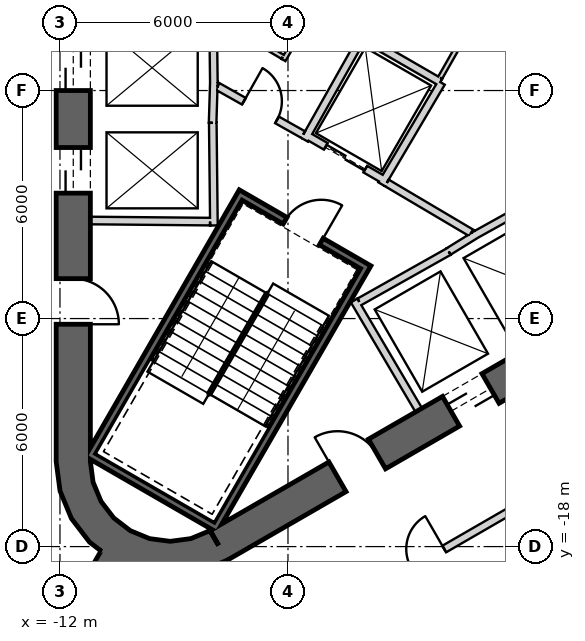
"""IFC4 building model, lengths in metres.
Left out: names, types, materials, properties, quantities, classifications, styles, units other than length and angle.
Written with IfcOpenShell. Run it as: python <this file> out.ifc"""

import sys

from ifc_helpers import new_model, si_unit, direction, frame, frame_2d, origin, place, context, subcontext, project, spatial, polyline, rectangle, outline, extrude, element, fill, save


model = new_model("IFC4")
c1 = context("Model", 3, precision=1e-05, world=origin(), true_north=direction((0.0, 1.0)))
c2 = subcontext(c1, "Body", "Model", "MODEL_VIEW")
j1 = project(units=[si_unit("LENGTHUNIT", "METRE"), si_unit("PLANEANGLEUNIT", "RADIAN")], contexts=[c1])
p1 = place(None, origin())
s1 = spatial("IfcSite", under=j1, at=p1, CompositionType="ELEMENT")
p2 = place(p1, origin())
s2 = spatial("IfcBuilding", under=s1, at=p2, CompositionType="ELEMENT")
p3 = place(p2, frame((0.0, 0.0, 70.1)))
s3 = spatial("IfcBuildingStorey", under=s2, at=p3, CompositionType="ELEMENT", Elevation=70.1)
p4 = place(p3, frame((-11.65, 15.762, 0.0), z_axis=(0.0, 0.0, 1.0), x_axis=(0.0, -1.0, 0.0)))
e1 = element("IfcWall", 1, at=p4, inside=s3, PredefinedType="SHEAR", context=c2, shape_type="SweptSolid", body=[
    extrude(rectangle(XDim=31.523, YDim=0.9, at=frame_2d((15.762, 0.0))), origin(), (0.0, 0.0, 1.0), 4.1),
])
p5 = place(p4, frame((7.062, 0.0, 0.0)))
e2 = element("IfcOpeningElement", 2, at=p5, cuts=e1, PredefinedType="OPENING", context=c2, shape_type="SweptSolid", body=[
    extrude(rectangle(XDim=1.2, YDim=2.4, at=frame_2d((0.6, 1.2))), frame((0.0, 0.46, 0.0), z_axis=(0.0, -1.0, 0.0), x_axis=(1.0, 0.0, 0.0)), (0.0, 0.0, 1.0), 0.92),
])
p6 = place(p4, frame((9.762, 0.0, 0.0)))
e3 = element("IfcOpeningElement", 3, at=p6, cuts=e1, PredefinedType="OPENING", context=c2, shape_type="SweptSolid", body=[
    extrude(rectangle(XDim=1.2, YDim=2.4, at=frame_2d((0.6, 1.2))), frame((0.0, 0.46, 0.0), z_axis=(0.0, -1.0, 0.0), x_axis=(1.0, 0.0, 0.0)), (0.0, 0.0, 1.0), 0.92),
])
p7 = place(p4, frame((12.462, 0.0, 0.0)))
e4 = element("IfcOpeningElement", 4, at=p7, cuts=e1, PredefinedType="OPENING", context=c2, shape_type="SweptSolid", body=[
    extrude(rectangle(XDim=1.2, YDim=2.4, at=frame_2d((0.6, 1.2))), frame((0.0, 0.46, 0.0), z_axis=(0.0, -1.0, 0.0), x_axis=(1.0, 0.0, 0.0)), (0.0, 0.0, 1.0), 0.92),
])
p8 = place(p4, frame((15.162, 0.0, 0.0)))
e5 = element("IfcOpeningElement", 5, at=p8, cuts=e1, PredefinedType="OPENING", context=c2, shape_type="SweptSolid", body=[
    extrude(rectangle(XDim=1.2, YDim=2.4, at=frame_2d((0.6, 1.2))), frame((0.0, 0.46, 0.0), z_axis=(0.0, -1.0, 0.0), x_axis=(1.0, 0.0, 0.0)), (0.0, 0.0, 1.0), 0.92),
])
p9 = place(p4, frame((17.862, 0.0, 0.0)))
e6 = element("IfcOpeningElement", 6, at=p9, cuts=e1, PredefinedType="OPENING", context=c2, shape_type="SweptSolid", body=[
    extrude(rectangle(XDim=1.2, YDim=2.4, at=frame_2d((0.6, 1.2))), frame((0.0, 0.46, 0.0), z_axis=(0.0, -1.0, 0.0), x_axis=(1.0, 0.0, 0.0)), (0.0, 0.0, 1.0), 0.92),
])
p10 = place(p4, frame((20.562, 0.0, 0.0)))
e7 = element("IfcOpeningElement", 7, at=p10, cuts=e1, PredefinedType="OPENING", context=c2, shape_type="SweptSolid", body=[
    extrude(rectangle(XDim=1.2, YDim=2.4, at=frame_2d((0.6, 1.2))), frame((0.0, 0.46, 0.0), z_axis=(0.0, -1.0, 0.0), x_axis=(1.0, 0.0, 0.0)), (0.0, 0.0, 1.0), 0.92),
])
p11 = place(p4, frame((23.262, 0.0, 0.0)))
e8 = element("IfcOpeningElement", 8, at=p11, cuts=e1, PredefinedType="OPENING", context=c2, shape_type="SweptSolid", body=[
    extrude(rectangle(XDim=1.2, YDim=2.4, at=frame_2d((0.6, 1.2))), frame((0.0, 0.46, 0.0), z_axis=(0.0, -1.0, 0.0), x_axis=(1.0, 0.0, 0.0)), (0.0, 0.0, 1.0), 0.92),
])
p12 = place(p4, frame((3.612, 0.0, 0.0)))
e9 = element("IfcOpeningElement", 9, at=p12, cuts=e1, PredefinedType="OPENING", context=c2, shape_type="SweptSolid", body=[
    extrude(rectangle(XDim=1.2, YDim=2.4, at=frame_2d((0.6, 1.2))), frame((0.0, 0.46, 0.0), z_axis=(0.0, -1.0, 0.0), x_axis=(1.0, 0.0, 0.0)), (0.0, 0.0, 1.0), 0.92),
])
p13 = place(p4, frame((26.712, 0.0, 0.0)))
e10 = element("IfcOpeningElement", 10, at=p13, cuts=e1, PredefinedType="OPENING", context=c2, shape_type="SweptSolid", body=[
    extrude(rectangle(XDim=1.2, YDim=2.4, at=frame_2d((0.6, 1.2))), frame((0.0, 0.46, 0.0), z_axis=(0.0, -1.0, 0.0), x_axis=(1.0, 0.0, 0.0)), (0.0, 0.0, 1.0), 0.92),
])
p14 = place(p3, frame((-7.825, -17.97, 0.0), z_axis=(0.0, 0.0, 1.0), x_axis=(0.866028369851, 0.499994862586, 0.0)))
e11 = element("IfcWall", 11, at=p14, inside=s3, PredefinedType="SHEAR", context=c2, shape_type="SweptSolid", body=[
    extrude(rectangle(XDim=31.523, YDim=0.9, at=frame_2d((15.762, 0.0))), origin(), (0.0, 0.0, 1.0), 4.1),
])
p15 = place(p14, frame((7.062, 0.0, 0.0)))
e12 = element("IfcOpeningElement", 12, at=p15, cuts=e11, PredefinedType="OPENING", context=c2, shape_type="SweptSolid", body=[
    extrude(rectangle(XDim=1.2, YDim=2.4, at=frame_2d((0.6, 1.2))), frame((0.0, 0.46, 0.0), z_axis=(0.0, -1.0, 0.0), x_axis=(1.0, 0.0, 0.0)), (0.0, 0.0, 1.0), 0.92),
])
p16 = place(p14, frame((9.762, 0.0, 0.0)))
e13 = element("IfcOpeningElement", 13, at=p16, cuts=e11, PredefinedType="OPENING", context=c2, shape_type="SweptSolid", body=[
    extrude(rectangle(XDim=1.2, YDim=2.4, at=frame_2d((0.6, 1.2))), frame((0.0, 0.46, 0.0), z_axis=(0.0, -1.0, 0.0), x_axis=(1.0, 0.0, 0.0)), (0.0, 0.0, 1.0), 0.92),
])
p17 = place(p14, frame((12.462, 0.0, 0.0)))
e14 = element("IfcOpeningElement", 14, at=p17, cuts=e11, PredefinedType="OPENING", context=c2, shape_type="SweptSolid", body=[
    extrude(rectangle(XDim=1.2, YDim=2.4, at=frame_2d((0.6, 1.2))), frame((0.0, 0.46, 0.0), z_axis=(0.0, -1.0, 0.0), x_axis=(1.0, 0.0, 0.0)), (0.0, 0.0, 1.0), 0.92),
])
p18 = place(p14, frame((15.162, 0.0, 0.0)))
e15 = element("IfcOpeningElement", 15, at=p18, cuts=e11, PredefinedType="OPENING", context=c2, shape_type="SweptSolid", body=[
    extrude(rectangle(XDim=1.2, YDim=2.4, at=frame_2d((0.6, 1.2))), frame((0.0, 0.46, 0.0), z_axis=(0.0, -1.0, 0.0), x_axis=(1.0, 0.0, 0.0)), (0.0, 0.0, 1.0), 0.92),
])
p19 = place(p14, frame((17.862, 0.0, 0.0)))
e16 = element("IfcOpeningElement", 16, at=p19, cuts=e11, PredefinedType="OPENING", context=c2, shape_type="SweptSolid", body=[
    extrude(rectangle(XDim=1.2, YDim=2.4, at=frame_2d((0.6, 1.2))), frame((0.0, 0.46, 0.0), z_axis=(0.0, -1.0, 0.0), x_axis=(1.0, 0.0, 0.0)), (0.0, 0.0, 1.0), 0.92),
])
p20 = place(p14, frame((20.562, 0.0, 0.0)))
e17 = element("IfcOpeningElement", 17, at=p20, cuts=e11, PredefinedType="OPENING", context=c2, shape_type="SweptSolid", body=[
    extrude(rectangle(XDim=1.2, YDim=2.4, at=frame_2d((0.6, 1.2))), frame((0.0, 0.46, 0.0), z_axis=(0.0, -1.0, 0.0), x_axis=(1.0, 0.0, 0.0)), (0.0, 0.0, 1.0), 0.92),
])
p21 = place(p14, frame((26.712, 0.0, 0.0)))
e18 = element("IfcOpeningElement", 18, at=p21, cuts=e11, PredefinedType="OPENING", context=c2, shape_type="SweptSolid", body=[
    extrude(rectangle(XDim=1.2, YDim=2.4, at=frame_2d((0.6, 1.2))), frame((0.0, 0.46, 0.0), z_axis=(0.0, -1.0, 0.0), x_axis=(1.0, 0.0, 0.0)), (0.0, 0.0, 1.0), 0.92),
])
p22 = place(p14, frame((3.612, 0.0, 0.0)))
e19 = element("IfcOpeningElement", 19, at=p22, cuts=e11, PredefinedType="OPENING", context=c2, shape_type="SweptSolid", body=[
    extrude(rectangle(XDim=1.2, YDim=2.4, at=frame_2d((0.6, 1.2))), frame((0.0, 0.46, 0.0), z_axis=(0.0, -1.0, 0.0), x_axis=(1.0, 0.0, 0.0)), (0.0, 0.0, 1.0), 0.92),
])
p23 = place(p3, origin())
e20 = element("IfcWall", 20, at=p23, inside=s3, PredefinedType="SHEAR", context=c2, shape_type="SweptSolid", body=[
    extrude(outline(polyline([(-12.1, -15.762), (-11.998, -16.538), (-11.698, -17.262), (-11.221, -17.883), (-10.6, -18.36), (-9.876, -18.659), (-9.1, -18.762), (-8.323, -18.659), (-7.6, -18.36), (-8.05, -17.58), (-8.556, -17.79), (-9.1, -17.862), (-9.644, -17.79), (-10.15, -17.58), (-10.585, -17.247), (-10.919, -16.812), (-11.128, -16.305), (-11.2, -15.762), (-12.1, -15.762)])), origin(), (0.0, 0.0, 1.0), 4.1),
])
p24 = place(p3, frame((-10.575, -18.316, 0.0), z_axis=(0.0, 0.0, 1.0), x_axis=(-0.499998162141, -0.86602646487, 0.0)))
e21 = element("IfcWall", 21, at=p24, inside=s3, PredefinedType="SHEAR", context=c2, shape_type="SweptSolid", body=[
    extrude(rectangle(XDim=13.669, YDim=0.8, at=frame_2d((6.835, 0.0))), origin(), (0.0, 0.0, 1.0), 4.1),
])
p25 = place(p24, frame((4.15, 0.0, 0.0)))
e22 = element("IfcOpeningElement", 22, at=p25, cuts=e21, PredefinedType="OPENING", context=c2, shape_type="SweptSolid", body=[
    extrude(rectangle(XDim=1.4, YDim=2.4, at=frame_2d((0.7, 1.2))), frame((0.0, 0.41, 0.0), z_axis=(0.0, -1.0, 0.0), x_axis=(1.0, 0.0, 0.0)), (0.0, 0.0, 1.0), 0.82),
])
p26 = place(p3, frame((-7.95, -5.772, 0.0), z_axis=(0.0, 0.0, 1.0), x_axis=(-0.030803413295, -0.999525462272, 0.0)))
e23 = element("IfcWall", 23, at=p26, inside=s3, PredefinedType="PLUMBINGWALL", context=c2, shape_type="SweptSolid", body=[
    extrude(rectangle(XDim=1.078, YDim=0.2, at=frame_2d((0.539, 0.0))), origin(), (0.0, 0.0, 1.0), 3.8),
])
p27 = place(p3, frame((-7.971, -4.05, 0.0), z_axis=(0.0, 0.0, 1.0), x_axis=(0.012042535896, -0.999927486035, 0.0)))
e24 = element("IfcWall", 24, at=p27, inside=s3, PredefinedType="PLUMBINGWALL", context=c2, shape_type="SweptSolid", body=[
    extrude(rectangle(XDim=1.845, YDim=0.2, at=frame_2d((0.922, 0.0))), origin(), (0.0, 0.0, 1.0), 3.8),
])
p28 = place(p3, frame((-7.979, -6.85, 0.0), z_axis=(0.0, 0.0, 1.0), x_axis=(0.011121475088, -0.999938154483, 0.0)))
e25 = element("IfcWall", 25, at=p28, inside=s3, PredefinedType="PLUMBINGWALL", context=c2, shape_type="SweptSolid", body=[
    extrude(rectangle(XDim=2.7, YDim=0.2, at=frame_2d((1.35, 0.0))), origin(), (0.0, 0.0, 1.0), 3.8),
])
p29 = place(p3, frame((-8.05, -9.449, 0.0), z_axis=(0.0, 0.0, 1.0), x_axis=(-0.999957467379, 0.009222983926, 0.0)))
e26 = element("IfcWall", 26, at=p29, inside=s3, PredefinedType="PLUMBINGWALL", context=c2, shape_type="SweptSolid", body=[
    extrude(rectangle(XDim=3.15, YDim=0.2, at=frame_2d((1.575, 0.0))), origin(), (0.0, 0.0, 1.0), 3.8),
])
p30 = place(p3, frame((-2.558, -14.409, 0.0), z_axis=(0.0, 0.0, 1.0), x_axis=(-0.507997497166, 0.861358544901, 0.0)))
e27 = element("IfcWall", 27, at=p30, inside=s3, PredefinedType="PLUMBINGWALL", context=c2, shape_type="SweptSolid", body=[
    extrude(rectangle(XDim=3.35, YDim=0.2, at=frame_2d((1.675, 0.0))), origin(), (0.0, 0.0, 1.0), 3.8),
])
p31 = place(p3, frame((-1.769, -10.237, 0.0), z_axis=(0.0, 0.0, 1.0), x_axis=(-0.871534483978, -0.490334215854, 0.0)))
e28 = element("IfcWall", 28, at=p31, inside=s3, PredefinedType="PLUMBINGWALL", context=c2, shape_type="SweptSolid", body=[
    extrude(rectangle(XDim=2.7, YDim=0.2, at=frame_2d((1.35, 0.0))), origin(), (0.0, 0.0, 1.0), 3.8),
])
p32 = place(p3, frame((-1.024, -9.771, 0.0), z_axis=(0.0, 0.0, 1.0), x_axis=(-0.850348075135, -0.526220629693, 0.0)))
e29 = element("IfcWall", 29, at=p32, inside=s3, PredefinedType="PLUMBINGWALL", context=c2, shape_type="SweptSolid", body=[
    extrude(rectangle(XDim=0.878, YDim=0.2, at=frame_2d((0.439, 0.0))), origin(), (0.0, 0.0, 1.0), 3.8),
])
p33 = place(p3, frame((-1.13, -9.831, 0.0), z_axis=(0.0, 0.0, 1.0), x_axis=(0.874269620932, 0.485440655401, 0.0)))
e30 = element("IfcWall", 30, at=p33, inside=s3, PredefinedType="PLUMBINGWALL", context=c2, shape_type="SweptSolid", body=[
    extrude(rectangle(XDim=1.845, YDim=0.2, at=frame_2d((0.922, 0.0))), origin(), (0.0, 0.0, 1.0), 3.8),
])
p34 = place(p3, frame((-3.905, -10.563, -0.3), z_axis=(0.0, 0.0, 1.0), x_axis=(-0.500012932018, -0.866017937352, 0.0)))
e31 = element("IfcWall", 31, at=p34, inside=s3, PredefinedType="SHEAR", context=c2, shape_type="SweptSolid", body=[
    extrude(rectangle(XDim=8.1, YDim=0.2, at=frame_2d((4.05, 0.0))), origin(), (0.0, 0.0, 1.0), 4.1),
])
p35 = place(p3, frame((-11.282, -15.541, -0.3), z_axis=(0.0, 0.0, 1.0), x_axis=(0.866000483506, -0.500043160704, 0.0)))
e32 = element("IfcWall", 32, at=p35, inside=s3, PredefinedType="SHEAR", context=c2, shape_type="SweptSolid", body=[
    extrude(rectangle(XDim=3.8, YDim=0.2, at=frame_2d((1.9, 0.0))), origin(), (0.0, 0.0, 1.0), 4.1),
])
p36 = place(p3, frame((-7.196, -8.663, -0.3), z_axis=(0.0, 0.0, 1.0), x_axis=(-0.499997992926, -0.866026562566, 0.0)))
e33 = element("IfcWall", 33, at=p36, inside=s3, PredefinedType="SHEAR", context=c2, shape_type="SweptSolid", body=[
    extrude(rectangle(XDim=7.9, YDim=0.2, at=frame_2d((3.95, 0.0))), origin(), (0.0, 0.0, 1.0), 4.1),
])
p37 = place(p3, frame((-4.041, -10.599, -0.3), z_axis=(0.0, 0.0, 1.0), x_axis=(-0.866047807691, 0.499961193289, 0.0)))
e34 = element("IfcWall", 34, at=p37, inside=s3, PredefinedType="SHEAR", context=c2, shape_type="SweptSolid", body=[
    extrude(rectangle(XDim=3.6, YDim=0.2, at=frame_2d((1.8, 0.0))), origin(), (0.0, 0.0, 1.0), 4.1),
])
p38 = place(p37, frame((1.25, 0.0, 0.3)))
e35 = element("IfcOpeningElement", 35, at=p38, cuts=e34, PredefinedType="OPENING", context=c2, shape_type="SweptSolid", body=[
    extrude(rectangle(XDim=1.1, YDim=2.1, at=frame_2d((0.55, 1.05))), frame((0.0, 0.11, 0.0), z_axis=(0.0, -1.0, 0.0), x_axis=(1.0, 0.0, 0.0)), (0.0, 0.0, 1.0), 0.22),
])
p39 = place(p3, frame((-3.446, -8.368, 0.0), z_axis=(0.0, 0.0, 1.0), x_axis=(-0.866024647952, 0.500001309137, 0.0)))
e36 = element("IfcWall", 36, at=p39, inside=s3, PredefinedType="PLUMBINGWALL", context=c2, shape_type="SweptSolid", body=[
    extrude(rectangle(XDim=2.4, YDim=0.2, at=frame_2d((1.2, 0.0))), origin(), (0.0, 0.0, 1.0), 3.8),
])
p40 = place(p39, frame((0.6, 0.0, 0.0)))
e37 = element("IfcOpeningElement", 37, at=p40, cuts=e36, PredefinedType="OPENING", context=c2, shape_type="SweptSolid", body=[
    extrude(rectangle(XDim=1.2, YDim=2.4, at=frame_2d((0.6, 1.2))), frame((0.0, 0.11, 0.0), z_axis=(0.0, -1.0, 0.0), x_axis=(1.0, 0.0, 0.0)), (0.0, 0.0, 1.0), 0.22),
])
p41 = place(p3, frame((-1.961, -5.796, 0.0), z_axis=(0.0, 0.0, 1.0), x_axis=(-0.508647062354, -0.860975125052, 0.0)))
e38 = element("IfcWall", 38, at=p41, inside=s3, PredefinedType="PLUMBINGWALL", context=c2, shape_type="SweptSolid", body=[
    extrude(rectangle(XDim=3.1, YDim=0.2, at=frame_2d((1.55, 0.0))), origin(), (0.0, 0.0, 1.0), 3.8),
])
p42 = place(p3, frame((-3.99, -4.509, 0.0), z_axis=(0.0, 0.0, 1.0), x_axis=(-0.491358283181, -0.870957540612, 0.0)))
e39 = element("IfcWall", 39, at=p42, inside=s3, PredefinedType="PLUMBINGWALL", context=c2, shape_type="SweptSolid", body=[
    extrude(rectangle(XDim=3.2, YDim=0.2, at=frame_2d((1.6, 0.0))), origin(), (0.0, 0.0, 1.0), 3.8),
])
p43 = place(p3, frame((-3.953, -4.646, 0.0), z_axis=(0.0, 0.0, 1.0), x_axis=(0.866065302921, -0.4999308863, 0.0)))
e40 = element("IfcWall", 40, at=p43, inside=s3, PredefinedType="PLUMBINGWALL", context=c2, shape_type="SweptSolid", body=[
    extrude(rectangle(XDim=2.264, YDim=0.2, at=frame_2d((1.132, 0.0))), origin(), (0.0, 0.0, 1.0), 3.8),
])
p44 = place(p3, frame((-3.401, -8.43, 0.0), z_axis=(0.0, 0.0, 1.0), x_axis=(0.860615607571, -0.509255118781, 0.0)))
e41 = element("IfcWall", 41, at=p44, inside=s3, PredefinedType="PARTITIONING", context=c2, shape_type="SweptSolid", body=[
    extrude(rectangle(XDim=2.581, YDim=0.2, at=frame_2d((1.29, 0.0))), origin(), (0.0, 0.0, 1.0), 3.8),
])
p45 = place(p3, frame((-7.849, -5.894, 0.0), z_axis=(0.0, 0.0, 1.0), x_axis=(0.871363259478, -0.490638431059, 0.0)))
e42 = element("IfcWall", 42, at=p45, inside=s3, PredefinedType="PARTITIONING", context=c2, shape_type="SweptSolid", body=[
    extrude(rectangle(XDim=2.581, YDim=0.2, at=frame_2d((1.291, 0.0))), origin(), (0.0, 0.0, 1.0), 3.8),
])
p46 = place(p45, frame((0.791, 0.0, 0.0)))
e43 = element("IfcOpeningElement", 43, at=p46, cuts=e42, PredefinedType="OPENING", context=c2, shape_type="SweptSolid", body=[
    extrude(rectangle(XDim=1.0, YDim=2.1, at=frame_2d((0.5, 1.05))), frame((0.0, 0.11, 0.0), z_axis=(0.0, -1.0, 0.0), x_axis=(1.0, 0.0, 0.0)), (0.0, 0.0, 1.0), 0.22),
])
p47 = place(p3, frame((0.224, -1.761, 0.0), z_axis=(0.0, 0.0, 1.0), x_axis=(-0.494327216836, -0.869275907118, 0.0)))
e44 = element("IfcWall", 44, at=p47, inside=s3, PredefinedType="PARTITIONING", context=c2, shape_type="SweptSolid", body=[
    extrude(rectangle(XDim=4.487, YDim=0.12, at=frame_2d((2.244, 0.0))), origin(), (0.0, 0.0, 1.0), 3.8),
])
p48 = place(p47, frame((1.895, 0.0, 0.0)))
e45 = element("IfcOpeningElement", 45, at=p48, cuts=e44, PredefinedType="OPENING", context=c2, shape_type="SweptSolid", body=[
    extrude(rectangle(XDim=0.8, YDim=2.1, at=frame_2d((0.4, 1.05))), frame((0.0, 0.07, 0.0), z_axis=(0.0, -1.0, 0.0), x_axis=(1.0, 0.0, 0.0)), (0.0, 0.0, 1.0), 0.14),
])
p49 = place(p3, frame((-6.118, -5.197, 0.0), z_axis=(0.0, 0.0, 1.0), x_axis=(0.499990139034, 0.866031096941, 0.0)))
e46 = element("IfcWall", 46, at=p49, inside=s3, PredefinedType="PARTITIONING", context=c2, shape_type="SweptSolid", body=[
    extrude(rectangle(XDim=3.0, YDim=0.12, at=frame_2d((1.5, 0.0))), origin(), (0.0, 0.0, 1.0), 3.8),
])
p50 = place(p3, frame((-7.95, -4.041, 0.0), z_axis=(0.0, 0.0, 1.0), x_axis=(0.860112457103, -0.510104461004, 0.0)))
e47 = element("IfcWall", 47, at=p50, inside=s3, PredefinedType="PARTITIONING", context=c2, shape_type="SweptSolid", body=[
    extrude(rectangle(XDim=2.104, YDim=0.12, at=frame_2d((1.052, 0.0))), origin(), (0.0, 0.0, 1.0), 3.8),
])
p51 = place(p3, frame((-6.852, -20.93, 0.0), z_axis=(0.0, 0.0, 1.0), x_axis=(0.866021591072, 0.500006603753, 0.0)))
e48 = element("IfcWall", 48, at=p51, inside=s3, PredefinedType="PARTITIONING", context=c2, shape_type="SweptSolid", body=[
    extrude(rectangle(XDim=10.387, YDim=0.2, at=frame_2d((5.194, 0.0))), origin(), (0.0, 0.0, 1.0), 2.98),
])
p52 = place(p51, frame((4.732, 0.0, 0.0)))
e49 = element("IfcOpeningElement", 49, at=p52, cuts=e48, PredefinedType="OPENING", context=c2, shape_type="SweptSolid", body=[
    extrude(rectangle(XDim=1.0, YDim=2.1, at=frame_2d((0.5, 1.05))), frame((0.0, 0.11, 0.0), z_axis=(0.0, -1.0, 0.0), x_axis=(1.0, 0.0, 0.0)), (0.0, 0.0, 1.0), 0.22),
])
p53 = place(p38, origin())
e50 = element("IfcDoor", 50, at=p53, inside=s3, OperationType="SINGLE_SWING_LEFT", PredefinedType="USERDEFINED", context=c2, shape_type="SweptSolid", body=[
    extrude(rectangle(XDim=1.1, YDim=2.1, at=frame_2d((0.55, 1.05))), frame((0.0, 0.025, 0.0), z_axis=(0.0, -1.0, 0.0), x_axis=(1.0, 0.0, 0.0)), (0.0, 0.0, 1.0), 0.05),
])
fill(e35, e50)
p54 = place(p46, origin())
e51 = element("IfcDoor", 51, at=p54, inside=s3, OperationType="SINGLE_SWING_LEFT", PredefinedType="USERDEFINED", context=c2, shape_type="SweptSolid", body=[
    extrude(rectangle(XDim=1.0, YDim=2.1, at=frame_2d((0.5, 1.05))), frame((0.0, 0.025, 0.0), z_axis=(0.0, -1.0, 0.0), x_axis=(1.0, 0.0, 0.0)), (0.0, 0.0, 1.0), 0.05),
])
fill(e43, e51)
p55 = place(p40, origin())
e52 = element("IfcDoor", 52, at=p55, inside=s3, OperationType="SLIDING_TO_LEFT", PredefinedType="USERDEFINED", context=c2, shape_type="SweptSolid", body=[
    extrude(rectangle(XDim=1.2, YDim=2.4, at=frame_2d((0.6, 1.2))), frame((0.0, 0.025, 0.0), z_axis=(0.0, -1.0, 0.0), x_axis=(1.0, 0.0, 0.0)), (0.0, 0.0, 1.0), 0.05),
])
fill(e37, e52)
p56 = place(p52, origin())
e53 = element("IfcDoor", 53, at=p56, inside=s3, OperationType="SINGLE_SWING_LEFT", PredefinedType="USERDEFINED", context=c2, shape_type="SweptSolid", body=[
    extrude(rectangle(XDim=1.0, YDim=2.1, at=frame_2d((0.5, 1.05))), frame((0.0, 0.025, 0.0), z_axis=(0.0, -1.0, 0.0), x_axis=(1.0, 0.0, 0.0)), (0.0, 0.0, 1.0), 0.05),
])
fill(e49, e53)
p57 = place(p10, origin())
e54 = element("IfcDoor", 54, at=p57, inside=s3, OperationType="SLIDING_TO_LEFT", PredefinedType="USERDEFINED", context=c2, shape_type="SweptSolid", body=[
    extrude(rectangle(XDim=1.2, YDim=2.4, at=frame_2d((0.6, 1.2))), frame((0.0, 0.025, 0.0), z_axis=(0.0, -1.0, 0.0), x_axis=(1.0, 0.0, 0.0)), (0.0, 0.0, 1.0), 0.05),
])
fill(e7, e54)
p58 = place(p11, origin())
e55 = element("IfcDoor", 55, at=p58, inside=s3, OperationType="SLIDING_TO_LEFT", PredefinedType="USERDEFINED", context=c2, shape_type="SweptSolid", body=[
    extrude(rectangle(XDim=1.2, YDim=2.4, at=frame_2d((0.6, 1.2))), frame((0.0, 0.025, 0.0), z_axis=(0.0, -1.0, 0.0), x_axis=(1.0, 0.0, 0.0)), (0.0, 0.0, 1.0), 0.05),
])
fill(e8, e55)
p59 = place(p15, origin())
e56 = element("IfcDoor", 56, at=p59, inside=s3, OperationType="SLIDING_TO_LEFT", PredefinedType="USERDEFINED", context=c2, shape_type="SweptSolid", body=[
    extrude(rectangle(XDim=1.2, YDim=2.4, at=frame_2d((0.6, 1.2))), frame((0.0, 0.025, 0.0), z_axis=(0.0, -1.0, 0.0), x_axis=(1.0, 0.0, 0.0)), (0.0, 0.0, 1.0), 0.05),
])
fill(e12, e56)
p60 = place(p13, origin())
e57 = element("IfcDoor", 57, at=p60, inside=s3, OperationType="SINGLE_SWING_RIGHT", PredefinedType="USERDEFINED", context=c2, shape_type="SweptSolid", body=[
    extrude(rectangle(XDim=1.2, YDim=2.4, at=frame_2d((0.6, 1.2))), frame((0.0, 0.025, 0.0), z_axis=(0.0, -1.0, 0.0), x_axis=(1.0, 0.0, 0.0)), (0.0, 0.0, 1.0), 0.05),
])
fill(e10, e57)
p61 = place(p22, origin())
e58 = element("IfcDoor", 58, at=p61, inside=s3, OperationType="SINGLE_SWING_LEFT", PredefinedType="USERDEFINED", context=c2, shape_type="SweptSolid", body=[
    extrude(rectangle(XDim=1.2, YDim=2.4, at=frame_2d((0.6, 1.2))), frame((0.0, 0.025, 0.0), z_axis=(0.0, -1.0, 0.0), x_axis=(1.0, 0.0, 0.0)), (0.0, 0.0, 1.0), 0.05),
])
fill(e19, e58)
save(model, sys.argv[1])
